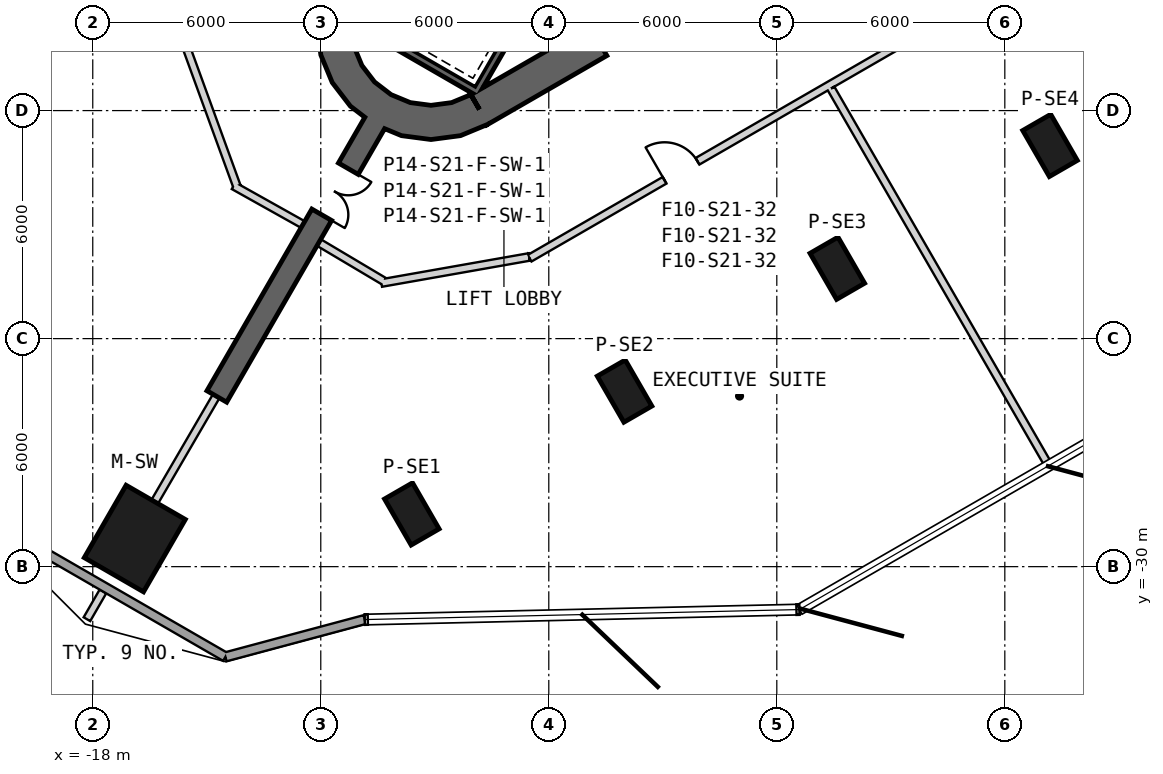
"""IFC4 building model, lengths in metres.
Left out: names, types, materials, properties, quantities, classifications, styles, units other than length and angle.
Written with IfcOpenShell. Run it as: python <this file> out.ifc"""

import sys

from ifc_helpers import new_model, si_unit, direction, frame, frame_2d, origin, origin_2d, place, context, subcontext, project, spatial, polyline, rectangle, outline, extrude, element, fill, save


model = new_model("IFC4")
c1 = context("Model", 3, precision=1e-05, world=origin(), true_north=direction((0.0, 1.0)))
c2 = subcontext(c1, "Body", "Model", "MODEL_VIEW")
j1 = project(units=[si_unit("LENGTHUNIT", "METRE"), si_unit("PLANEANGLEUNIT", "RADIAN")], contexts=[c1])
p1 = place(None, origin())
s1 = spatial("IfcSite", under=j1, at=p1, CompositionType="ELEMENT")
p2 = place(p1, origin())
s2 = spatial("IfcBuilding", under=s1, at=p2, CompositionType="ELEMENT")
p3 = place(p2, frame((0.0, 0.0, 333.8)))
s3 = spatial("IfcBuildingStorey", under=s2, at=p3, CompositionType="ELEMENT", Elevation=333.8)
p4 = place(p3, frame((-16.894, -29.26, 0.0), z_axis=(0.0, 0.0, 1.0), x_axis=(-0.5, -0.866025403784, 0.0)))
e1 = element("IfcColumn", 1, at=p4, inside=s3, PredefinedType="COLUMN", context=c2, shape_type="SweptSolid", body=[
    extrude(rectangle(XDim=2.2, YDim=1.8, at=origin_2d()), origin(), (0.0, 0.0, 1.0), 3.9),
])
for number, where, z_axis, x_axis in (
    (2, (-9.604, -28.613, 0.0), (0.0, 0.0, 1.0), (0.5, -0.866, 0.0)),
    (3, (-4.006, -25.381, 0.0), (0.0, 0.0, 1.0), (0.5, -0.866, 0.0)),
    (4, (1.592, -22.149, 0.0), (0.0, 0.0, 1.0), (0.5, -0.866, 0.0)),
    (5, (7.19, -18.917, 0.0), (0.0, 0.0, 1.0), (0.5, -0.866, 0.0)),
):
    element("IfcColumn", number, at=place(p3, frame(where, z_axis=z_axis, x_axis=x_axis)), inside=s3, PredefinedType="COLUMN", context=c2, shape_type="SweptSolid", body=[
        extrude(rectangle(XDim=1.4, YDim=0.85, at=origin_2d()), origin(), (0.0, 0.0, 1.0), 3.9),
    ])
p5 = place(p3, frame((-7.825, -17.97, 0.0), z_axis=(0.0, 0.0, 1.0), x_axis=(0.866028369851, 0.499994862586, 0.0)))
e6 = element("IfcWall", 6, at=p5, inside=s3, PredefinedType="SHEAR", context=c2, shape_type="SweptSolid", body=[
    extrude(rectangle(XDim=31.523, YDim=0.9, at=frame_2d((15.762, 0.0))), origin(), (0.0, 0.0, 1.0), 3.9),
])
p6 = place(p5, frame((17.862, 0.0, 0.0)))
e7 = element("IfcOpeningElement", 7, at=p6, cuts=e6, PredefinedType="OPENING", context=c2, shape_type="SweptSolid", body=[
    extrude(rectangle(XDim=1.2, YDim=2.4, at=frame_2d((0.6, 1.2))), frame((0.0, 0.46, 0.0), z_axis=(0.0, -1.0, 0.0), x_axis=(1.0, 0.0, 0.0)), (0.0, 0.0, 1.0), 0.92),
])
p7 = place(p5, frame((20.562, 0.0, 0.0)))
e8 = element("IfcOpeningElement", 8, at=p7, cuts=e6, PredefinedType="OPENING", context=c2, shape_type="SweptSolid", body=[
    extrude(rectangle(XDim=1.2, YDim=2.4, at=frame_2d((0.6, 1.2))), frame((0.0, 0.46, 0.0), z_axis=(0.0, -1.0, 0.0), x_axis=(1.0, 0.0, 0.0)), (0.0, 0.0, 1.0), 0.92),
])
p8 = place(p5, frame((26.712, 0.0, 0.0)))
e9 = element("IfcOpeningElement", 9, at=p8, cuts=e6, PredefinedType="OPENING", context=c2, shape_type="SweptSolid", body=[
    extrude(rectangle(XDim=1.2, YDim=2.4, at=frame_2d((0.6, 1.2))), frame((0.0, 0.46, 0.0), z_axis=(0.0, -1.0, 0.0), x_axis=(1.0, 0.0, 0.0)), (0.0, 0.0, 1.0), 0.92),
])
p9 = place(p5, frame((3.612, 0.0, 0.0)))
e10 = element("IfcOpeningElement", 10, at=p9, cuts=e6, PredefinedType="OPENING", context=c2, shape_type="SweptSolid", body=[
    extrude(rectangle(XDim=1.2, YDim=2.4, at=frame_2d((0.6, 1.2))), frame((0.0, 0.46, 0.0), z_axis=(0.0, -1.0, 0.0), x_axis=(1.0, 0.0, 0.0)), (0.0, 0.0, 1.0), 0.92),
])
p10 = place(p3, origin())
e11 = element("IfcWall", 11, at=p10, inside=s3, PredefinedType="SHEAR", context=c2, shape_type="SweptSolid", body=[
    extrude(outline(polyline([(-12.1, -15.762), (-11.998, -16.538), (-11.698, -17.262), (-11.221, -17.883), (-10.6, -18.36), (-9.876, -18.659), (-9.1, -18.762), (-8.323, -18.659), (-7.6, -18.36), (-8.05, -17.58), (-8.556, -17.79), (-9.1, -17.862), (-9.644, -17.79), (-10.15, -17.58), (-10.585, -17.247), (-10.919, -16.812), (-11.128, -16.305), (-11.2, -15.762), (-12.1, -15.762)])), origin(), (0.0, 0.0, 1.0), 3.9),
])
p11 = place(p3, frame((-10.575, -18.316, 0.0), z_axis=(0.0, 0.0, 1.0), x_axis=(-0.499998447599, -0.866026300061, 0.0)))
e12 = element("IfcWall", 12, at=p11, inside=s3, PredefinedType="SHEAR", context=c2, shape_type="SweptSolid", body=[
    extrude(rectangle(XDim=8.321, YDim=0.6, at=frame_2d((4.16, 0.0))), origin(), (0.0, 0.0, 1.0), 3.9),
])
p12 = place(p11, frame((1.4, 0.0, 0.0)))
e13 = element("IfcOpeningElement", 13, at=p12, cuts=e12, PredefinedType="OPENING", context=c2, shape_type="SweptSolid", body=[
    extrude(rectangle(XDim=1.4, YDim=2.4, at=frame_2d((0.7, 1.2))), frame((0.0, 0.31, 0.0), z_axis=(0.0, -1.0, 0.0), x_axis=(1.0, 0.0, 0.0)), (0.0, 0.0, 1.0), 0.62),
])
p13 = place(p3, frame((-20.783, -28.753, 0.0), z_axis=(0.0, 0.0, 1.0), x_axis=(0.866019457076, -0.500010299859, 0.0)))
e14 = element("IfcWall", 14, at=p13, inside=s3, PredefinedType="SOLIDWALL", context=c2, shape_type="SweptSolid", body=[
    extrude(rectangle(XDim=7.244, YDim=0.24, at=frame_2d((3.622, 0.0))), origin(), (0.0, 0.0, 1.0), 3.6),
])
p14 = place(p3, frame((-14.51, -32.375, 0.0), z_axis=(0.0, 0.0, 1.0), x_axis=(0.965919344782, 0.258843233206, 0.0)))
e15 = element("IfcWall", 15, at=p14, inside=s3, PredefinedType="SOLIDWALL", context=c2, shape_type="SweptSolid", body=[
    extrude(rectangle(XDim=3.796, YDim=0.24, at=frame_2d((1.898, 0.0))), origin(), (0.0, 0.0, 1.0), 3.6),
])
p15 = place(p3, frame((-3.905, -10.563, -0.3), z_axis=(0.0, 0.0, 1.0), x_axis=(-0.500012932018, -0.866017937352, 0.0)))
e16 = element("IfcWall", 16, at=p15, inside=s3, PredefinedType="SHEAR", context=c2, shape_type="SweptSolid", body=[
    extrude(rectangle(XDim=8.1, YDim=0.2, at=frame_2d((4.05, 0.0))), origin(), (0.0, 0.0, 1.0), 3.9),
])
p16 = place(p3, frame((-11.282, -15.541, -0.3), z_axis=(0.0, 0.0, 1.0), x_axis=(0.866000483506, -0.500043160704, 0.0)))
e17 = element("IfcWall", 17, at=p16, inside=s3, PredefinedType="SHEAR", context=c2, shape_type="SweptSolid", body=[
    extrude(rectangle(XDim=3.8, YDim=0.2, at=frame_2d((1.9, 0.0))), origin(), (0.0, 0.0, 1.0), 3.9),
])
p17 = place(p3, frame((-14.293, -19.978, 0.0), z_axis=(0.0, 0.0, 1.0), x_axis=(0.872510000486, -0.48859625362, 0.0)))
e18 = element("IfcWall", 18, at=p17, inside=s3, PredefinedType="PARTITIONING", context=c2, shape_type="SweptSolid", body=[
    extrude(rectangle(XDim=2.09, YDim=0.2, at=frame_2d((1.045, 0.0))), origin(), (0.0, 0.0, 1.0), 3.6),
])
p18 = place(p3, frame((-15.534, -16.346, 0.0), z_axis=(0.0, 0.0, 1.0), x_axis=(0.342001008711, -0.939699584996, 0.0)))
e19 = element("IfcWall", 19, at=p18, inside=s3, PredefinedType="PARTITIONING", context=c2, shape_type="SweptSolid", body=[
    extrude(rectangle(XDim=3.875, YDim=0.2, at=frame_2d((1.938, 0.0))), origin(), (0.0, 0.0, 1.0), 2.88),
])
p19 = place(p3, frame((-6.505, -21.885, 0.0), z_axis=(0.0, 0.0, 1.0), x_axis=(0.86602457258, 0.500001439686, 0.0)))
e20 = element("IfcWall", 20, at=p19, inside=s3, PredefinedType="PARTITIONING", context=c2, shape_type="SweptSolid", body=[
    extrude(rectangle(XDim=32.952, YDim=0.2, at=frame_2d((16.476, 0.0))), origin(), (0.0, 0.0, 1.0), 2.97),
])
p20 = place(p19, frame((28.061, 0.0, 0.0)))
e21 = element("IfcOpeningElement", 21, at=p20, cuts=e20, PredefinedType="OPENING", context=c2, shape_type="SweptSolid", body=[
    extrude(rectangle(XDim=1.0, YDim=2.1, at=frame_2d((0.5, 1.05))), frame((0.0, 0.11, 0.0), z_axis=(0.0, -1.0, 0.0), x_axis=(1.0, 0.0, 0.0)), (0.0, 0.0, 1.0), 0.22),
])
p21 = place(p19, frame((16.137, 0.0, 0.0)))
e22 = element("IfcOpeningElement", 22, at=p21, cuts=e20, PredefinedType="OPENING", context=c2, shape_type="SweptSolid", body=[
    extrude(rectangle(XDim=1.0, YDim=2.1, at=frame_2d((0.5, 1.05))), frame((0.0, 0.11, 0.0), z_axis=(0.0, -1.0, 0.0), x_axis=(1.0, 0.0, 0.0)), (0.0, 0.0, 1.0), 0.22),
])
p22 = place(p19, frame((4.101, 0.0, 0.0)))
e23 = element("IfcOpeningElement", 23, at=p22, cuts=e20, PredefinedType="OPENING", context=c2, shape_type="SweptSolid", body=[
    extrude(rectangle(XDim=1.0, YDim=2.1, at=frame_2d((0.5, 1.05))), frame((0.0, 0.11, 0.0), z_axis=(0.0, -1.0, 0.0), x_axis=(1.0, 0.0, 0.0)), (0.0, 0.0, 1.0), 0.22),
])
p23 = place(p3, frame((-10.406, -22.538, 0.0), z_axis=(0.0, 0.0, 1.0), x_axis=(0.98480284819, 0.173675991999, 0.0)))
e24 = element("IfcWall", 24, at=p23, inside=s3, PredefinedType="PARTITIONING", context=c2, shape_type="SweptSolid", body=[
    extrude(rectangle(XDim=3.949, YDim=0.2, at=frame_2d((1.974, 0.0))), origin(), (0.0, 0.0, 1.0), 2.88),
])
p24 = place(p3, frame((-12.05, -21.472, 0.0), z_axis=(0.0, 0.0, 1.0), x_axis=(0.859577966481, -0.511004617924, 0.0)))
e25 = element("IfcWall", 25, at=p24, inside=s3, PredefinedType="PARTITIONING", context=c2, shape_type="SweptSolid", body=[
    extrude(rectangle(XDim=1.998, YDim=0.2, at=frame_2d((0.999, 0.0))), origin(), (0.0, 0.0, 1.0), 3.6),
])
p25 = place(p3, frame((-18.153, -31.383, 0.0), z_axis=(0.0, 0.0, 1.0), x_axis=(0.499973348067, 0.866040790738, 0.0)))
e26 = element("IfcWall", 26, at=p25, inside=s3, PredefinedType="PARTITIONING", context=c2, shape_type="SweptSolid", body=[
    extrude(rectangle(XDim=0.842, YDim=0.2, at=frame_2d((0.421, 0.0))), origin(), (0.0, 0.0, 1.0), 3.6),
])
p26 = place(p3, frame((-16.37, -28.293, 0.0), z_axis=(0.0, 0.0, 1.0), x_axis=(0.503233779138, 0.864150313044, 0.0)))
e27 = element("IfcWall", 27, at=p26, inside=s3, PredefinedType="PARTITIONING", context=c2, shape_type="SweptSolid", body=[
    extrude(rectangle(XDim=3.217, YDim=0.2, at=frame_2d((1.608, 0.0))), origin(), (0.0, 0.0, 1.0), 3.17),
])
p27 = place(p3, frame((7.156, -27.343, 0.0), z_axis=(0.0, 0.0, 1.0), x_axis=(-0.499948106888, 0.866055362214, 0.0)))
e28 = element("IfcWall", 28, at=p27, inside=s3, PredefinedType="PARTITIONING", context=c2, shape_type="SweptSolid", body=[
    extrude(rectangle(XDim=11.457, YDim=0.2, at=frame_2d((5.729, 0.0))), origin(), (0.0, 0.0, 1.0), 3.6),
])
p28 = place(p22, origin())
e29 = element("IfcDoor", 29, at=p28, inside=s3, OperationType="SINGLE_SWING_RIGHT", PredefinedType="USERDEFINED", context=c2, shape_type="SweptSolid", body=[
    extrude(rectangle(XDim=1.0, YDim=2.1, at=frame_2d((0.5, 1.05))), frame((0.0, 0.025, 0.0), z_axis=(0.0, -1.0, 0.0), x_axis=(1.0, 0.0, 0.0)), (0.0, 0.0, 1.0), 0.05),
])
fill(e23, e29)
p29 = place(p12, origin())
e30 = element("IfcDoor", 30, at=p29, inside=s3, OperationType="DOUBLE_DOOR_SINGLE_SWING", PredefinedType="NOTDEFINED", context=c2, shape_type="SweptSolid", body=[
    extrude(rectangle(XDim=1.4, YDim=2.4, at=frame_2d((0.7, 1.2))), frame((0.0, 0.025, 0.0), z_axis=(0.0, -1.0, 0.0), x_axis=(1.0, 0.0, 0.0)), (0.0, 0.0, 1.0), 0.05),
])
fill(e13, e30)
save(model, sys.argv[1])
